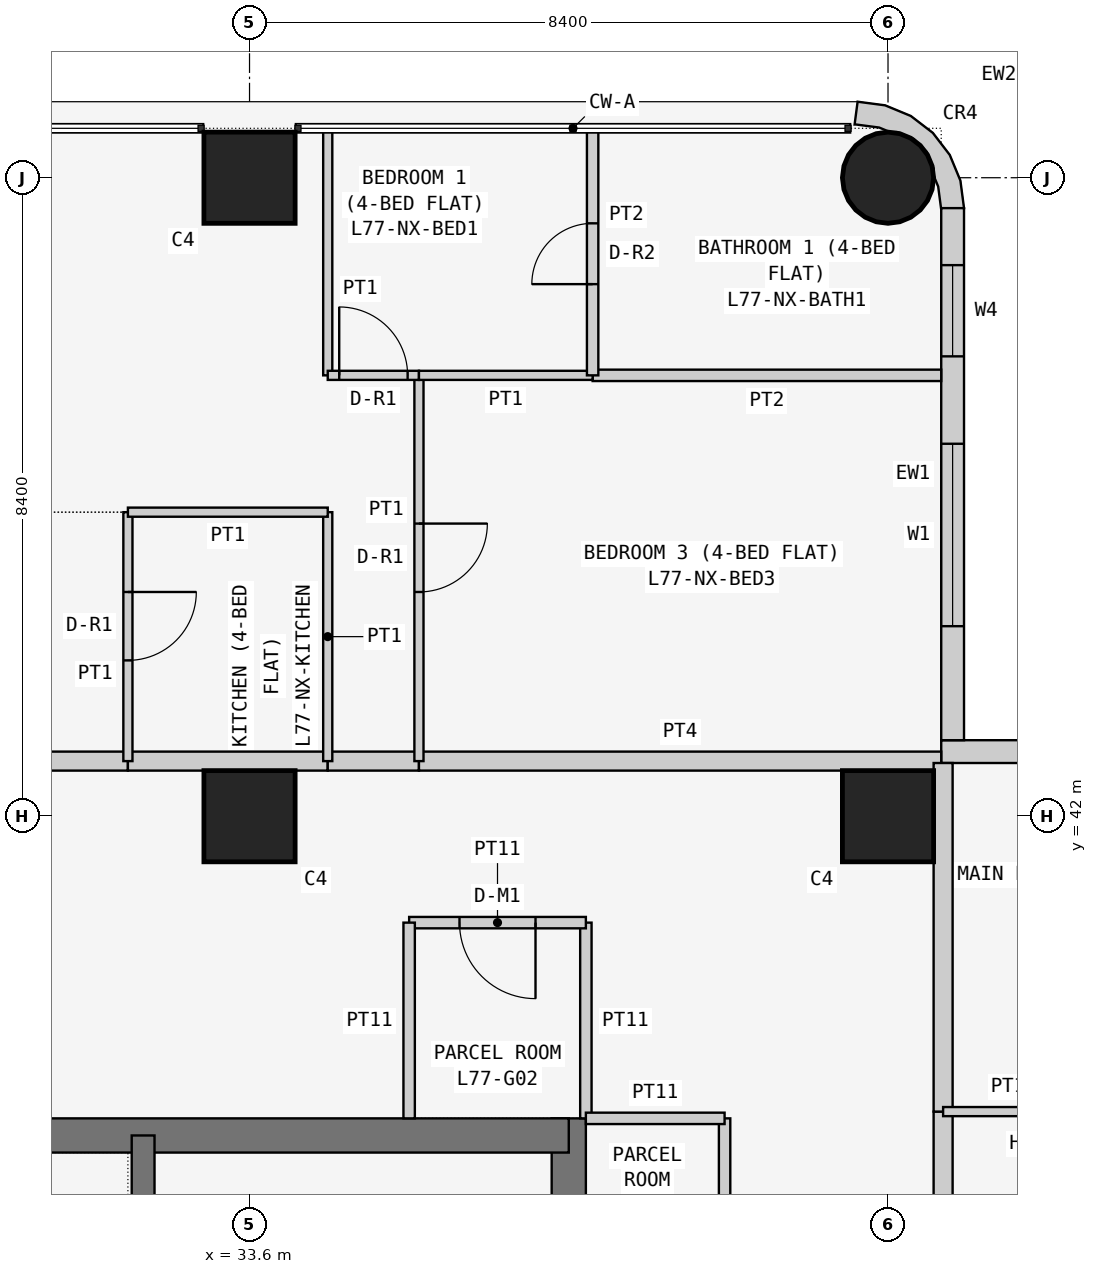
"""IFC4 building model, lengths in metres.
Left out: names, types, materials, properties, quantities, classifications, styles, units other than length and angle.
Written with IfcOpenShell. Run it as: python <this file> out.ifc"""

import sys

from ifc_helpers import new_model, si_unit, direction, frame, frame_2d, origin, origin_2d, place, context, subcontext, project, spatial, polyline, rectangle, circle, outline, extrude, element, fill, save


model = new_model("IFC4")
c1 = context("Model", 3, precision=1e-05, world=origin(), true_north=direction((0.0, 1.0)))
c2 = subcontext(c1, "Body", "Model", "MODEL_VIEW")
j1 = project(units=[si_unit("LENGTHUNIT", "METRE"), si_unit("PLANEANGLEUNIT", "RADIAN")], contexts=[c1])
p1 = place(None, origin())
s1 = spatial("IfcSite", under=j1, at=p1, CompositionType="ELEMENT")
p2 = place(p1, origin())
s2 = spatial("IfcBuilding", under=s1, at=p2, CompositionType="ELEMENT")
p3 = place(p2, frame((0.0, 0.0, 293.7)))
s3 = spatial("IfcBuildingStorey", under=s2, at=p3, CompositionType="ELEMENT", Elevation=293.7)
for number, where, z_axis, x_axis in (
    (1, (33.6, 42.0, 0.0), (0.0, 0.0, 1.0), (1.0, 0.0, 0.0)),
    (2, (33.6, 50.4, 0.0), (0.0, 0.0, 1.0), (1.0, 0.0, 0.0)),
    (3, (42.0, 42.0, 0.0), (0.0, 0.0, 1.0), (1.0, 0.0, 0.0)),
):
    element("IfcColumn", number, at=place(p3, frame(where, z_axis=z_axis, x_axis=x_axis)), inside=s3, PredefinedType="COLUMN", context=c2, shape_type="SweptSolid", body=[
        extrude(rectangle(XDim=1.2, YDim=1.2, at=origin_2d()), origin(), (0.0, 0.0, 1.0), 3.6),
    ])
p4 = place(p3, frame((42.0, 50.4, 0.0), z_axis=(0.0, 0.0, 1.0), x_axis=(1.0, 0.0, 0.0)))
e4 = element("IfcColumn", 4, at=p4, inside=s3, PredefinedType="COLUMN", context=c2, shape_type="SweptSolid", body=[
    extrude(circle(Radius=0.6, at=origin_2d()), origin(), (0.0, 0.0, 1.0), 3.6),
])
p5 = place(p3, frame((37.8, 21.0, 0.0), z_axis=(0.0, 0.0, 1.0), x_axis=(0.0, 1.0, 0.0)))
e5 = element("IfcWall", 5, at=p5, inside=s3, PredefinedType="SHEAR", context=c2, shape_type="SweptSolid", body=[
    extrude(rectangle(XDim=17.025, YDim=0.45, at=frame_2d((8.512, 0.0))), origin(), (0.0, 0.0, 1.0), 3.6),
])
p6 = place(p5, frame((5.2, 0.0, 0.0)))
e6 = element("IfcOpeningElement", 6, at=p6, cuts=e5, PredefinedType="OPENING", context=c2, shape_type="SweptSolid", body=[
    extrude(rectangle(XDim=1.2, YDim=2.1, at=frame_2d((0.6, 1.05))), frame((0.0, 0.235, 0.0), z_axis=(0.0, -1.0, 0.0), x_axis=(1.0, 0.0, 0.0)), (0.0, 0.0, 1.0), 0.47),
])
p7 = place(p3, frame((37.8, 37.8, 0.0), z_axis=(0.0, 0.0, 1.0), x_axis=(-1.0, 0.0, 0.0)))
e7 = element("IfcWall", 7, at=p7, inside=s3, PredefinedType="SHEAR", context=c2, shape_type="SweptSolid", body=[
    extrude(rectangle(XDim=17.025, YDim=0.45, at=frame_2d((8.513, 0.0))), origin(), (0.0, 0.0, 1.0), 3.6),
])
p8 = place(p3, frame((32.2, 29.25, 0.0), z_axis=(0.0, 0.0, 1.0), x_axis=(0.0, 1.0, 0.0)))
e8 = element("IfcWall", 8, at=p8, inside=s3, PredefinedType="SHEAR", context=c2, shape_type="SweptSolid", body=[
    extrude(rectangle(XDim=8.55, YDim=0.3, at=frame_2d((4.275, 0.0))), origin(), (0.0, 0.0, 1.0), 3.6),
])
p9 = place(p3, frame((50.0, 42.85, 0.0), z_axis=(0.0, 0.0, 1.0), x_axis=(-1.0, 0.0, 0.0)))
e9 = element("IfcWall", 9, at=p9, inside=s3, PredefinedType="SOLIDWALL", context=c2, shape_type="SweptSolid", body=[
    extrude(rectangle(XDim=7.3, YDim=0.3, at=frame_2d((3.65, 0.0))), origin(), (0.0, 0.0, 1.0), 3.45),
])
p10 = place(p9, frame((3.1, 0.0, 0.9)))
e10 = element("IfcOpeningElement", 10, at=p10, cuts=e9, PredefinedType="OPENING", context=c2, shape_type="SweptSolid", body=[
    extrude(rectangle(XDim=2.4, YDim=1.5, at=frame_2d((1.2, 0.75))), frame((0.0, 0.16, 0.0), z_axis=(0.0, -1.0, 0.0), x_axis=(1.0, 0.0, 0.0)), (0.0, 0.0, 1.0), 0.32),
])
p11 = place(p9, frame((0.75, 0.0, 0.9)))
e11 = element("IfcOpeningElement", 11, at=p11, cuts=e9, PredefinedType="OPENING", context=c2, shape_type="SweptSolid", body=[
    extrude(rectangle(XDim=1.2, YDim=1.5, at=frame_2d((0.6, 0.75))), frame((0.0, 0.16, 0.0), z_axis=(0.0, -1.0, 0.0), x_axis=(1.0, 0.0, 0.0)), (0.0, 0.0, 1.0), 0.32),
])
p12 = place(p3, frame((42.85, 43.0, 0.0), z_axis=(0.0, 0.0, 1.0), x_axis=(0.0, 1.0, 0.0)))
e12 = element("IfcWall", 12, at=p12, inside=s3, PredefinedType="SOLIDWALL", context=c2, shape_type="SweptSolid", body=[
    extrude(rectangle(XDim=7.0, YDim=0.3, at=frame_2d((3.5, 0.0))), origin(), (0.0, 0.0, 1.0), 3.45),
])
p13 = place(p12, frame((1.5, 0.0, 0.9)))
e13 = element("IfcOpeningElement", 13, at=p13, cuts=e12, PredefinedType="OPENING", context=c2, shape_type="SweptSolid", body=[
    extrude(rectangle(XDim=2.4, YDim=1.5, at=frame_2d((1.2, 0.75))), frame((0.0, 0.16, 0.0), z_axis=(0.0, -1.0, 0.0), x_axis=(1.0, 0.0, 0.0)), (0.0, 0.0, 1.0), 0.32),
])
p14 = place(p12, frame((5.05, 0.0, 0.9)))
e14 = element("IfcOpeningElement", 14, at=p14, cuts=e12, PredefinedType="OPENING", context=c2, shape_type="SweptSolid", body=[
    extrude(rectangle(XDim=1.2, YDim=1.5, at=frame_2d((0.6, 0.75))), frame((0.0, 0.16, 0.0), z_axis=(0.0, -1.0, 0.0), x_axis=(1.0, 0.0, 0.0)), (0.0, 0.0, 1.0), 0.32),
])
p15 = place(p3, frame((42.576, 50.038, 0.0), z_axis=(0.0, 0.0, 1.0), x_axis=(0.707106781187, 0.707106781187, 0.0)))
e15 = element("IfcWall", 15, at=p15, inside=s3, PredefinedType="SOLIDWALL", context=c2, shape_type="SweptSolid", body=[
    extrude(outline(polyline([(0.233, 0.114), (0.047, -0.129), (0.033, -0.143), (0.273, -0.327), (0.495, -0.037), (0.635, 0.3), (0.683, 0.663), (0.635, 1.025), (0.495, 1.363), (0.273, 1.653), (0.033, 1.469), (0.047, 1.455), (0.233, 1.212), (0.292, 1.069), (0.358, 1.003), (0.449, 0.782), (0.449, 0.543), (0.358, 0.322), (0.292, 0.257), (0.233, 0.114)])), origin(), (0.0, 0.0, 1.0), 3.45),
])
p16 = place(p3, frame((38.025, 38.025, 0.0), z_axis=(0.0, 0.0, 1.0), x_axis=(0.0, 1.0, 0.0)))
e16 = element("IfcWall", 16, at=p16, inside=s3, PredefinedType="PARTITIONING", context=c2, shape_type="SweptSolid", body=[
    extrude(rectangle(XDim=2.575, YDim=0.15, at=frame_2d((1.288, 0.0))), origin(), (0.0, 0.0, 1.0), 3.45),
])
p17 = place(p3, frame((38.025, 40.6, 0.0), z_axis=(0.0, 0.0, 1.0), x_axis=(-1.0, 0.0, 0.0)))
e17 = element("IfcWall", 17, at=p17, inside=s3, PredefinedType="PARTITIONING", context=c2, shape_type="SweptSolid", body=[
    extrude(rectangle(XDim=2.325, YDim=0.15, at=frame_2d((1.163, 0.0))), origin(), (0.0, 0.0, 1.0), 3.45),
])
p18 = place(p17, frame((0.663, 0.0, 0.0)))
e18 = element("IfcOpeningElement", 18, at=p18, cuts=e17, PredefinedType="OPENING", context=c2, shape_type="SweptSolid", body=[
    extrude(rectangle(XDim=1.0, YDim=2.1, at=frame_2d((0.5, 1.05))), frame((0.0, 0.085, 0.0), z_axis=(0.0, -1.0, 0.0), x_axis=(1.0, 0.0, 0.0)), (0.0, 0.0, 1.0), 0.17),
])
p19 = place(p3, frame((35.7, 40.6, 0.0), z_axis=(0.0, 0.0, 1.0), x_axis=(0.0, -1.0, 0.0)))
e19 = element("IfcWall", 19, at=p19, inside=s3, PredefinedType="PARTITIONING", context=c2, shape_type="SweptSolid", body=[
    extrude(rectangle(XDim=2.575, YDim=0.15, at=frame_2d((1.288, 0.0))), origin(), (0.0, 0.0, 1.0), 3.45),
])
p20 = place(p3, frame((39.85, 34.5, 0.0), z_axis=(0.0, 0.0, 1.0), x_axis=(0.0, 1.0, 0.0)))
e20 = element("IfcWall", 20, at=p20, inside=s3, PredefinedType="PARTITIONING", context=c2, shape_type="SweptSolid", body=[
    extrude(rectangle(XDim=3.525, YDim=0.15, at=frame_2d((1.762, 0.0))), origin(), (0.0, 0.0, 1.0), 3.45),
])
p21 = place(p20, frame((1.262, 0.0, 0.0)))
e21 = element("IfcOpeningElement", 21, at=p21, cuts=e20, PredefinedType="OPENING", context=c2, shape_type="SweptSolid", body=[
    extrude(rectangle(XDim=1.0, YDim=2.1, at=frame_2d((0.5, 1.05))), frame((0.0, 0.085, 0.0), z_axis=(0.0, -1.0, 0.0), x_axis=(1.0, 0.0, 0.0)), (0.0, 0.0, 1.0), 0.17),
])
p22 = place(p3, frame((39.85, 38.025, 0.0), z_axis=(0.0, 0.0, 1.0), x_axis=(-1.0, 0.0, 0.0)))
e22 = element("IfcWall", 22, at=p22, inside=s3, PredefinedType="PARTITIONING", context=c2, shape_type="SweptSolid", body=[
    extrude(rectangle(XDim=1.825, YDim=0.15, at=frame_2d((0.913, 0.0))), origin(), (0.0, 0.0, 1.0), 3.45),
])
p23 = place(p3, frame((26.8, 42.725, 0.0), z_axis=(0.0, 0.0, 1.0), x_axis=(1.0, 0.0, 0.0)))
e23 = element("IfcWall", 23, at=p23, inside=s3, PredefinedType="PARTITIONING", context=c2, shape_type="SweptSolid", body=[
    extrude(rectangle(XDim=5.2, YDim=0.25, at=frame_2d((2.6, 0.0))), origin(), (0.0, 0.0, 1.0), 3.45),
])
p24 = place(p23, frame((2.1, 0.0, 0.0)))
e24 = element("IfcOpeningElement", 24, at=p24, cuts=e23, PredefinedType="OPENING", context=c2, shape_type="SweptSolid", body=[
    extrude(rectangle(XDim=1.0, YDim=2.1, at=frame_2d((0.5, 1.05))), frame((0.0, 0.135, 0.0), z_axis=(0.0, -1.0, 0.0), x_axis=(1.0, 0.0, 0.0)), (0.0, 0.0, 1.0), 0.27),
])
p25 = place(p3, frame((32.0, 42.725, 0.0), z_axis=(0.0, 0.0, 1.0), x_axis=(1.0, 0.0, 0.0)))
e25 = element("IfcWall", 25, at=p25, inside=s3, PredefinedType="PARTITIONING", context=c2, shape_type="SweptSolid", body=[
    extrude(rectangle(XDim=2.629, YDim=0.25, at=frame_2d((1.314, 0.0))), origin(), (0.0, 0.0, 1.0), 3.45),
])
p26 = place(p3, frame((34.629, 42.725, 0.0), z_axis=(0.0, 0.0, 1.0), x_axis=(1.0, 0.0, 0.0)))
e26 = element("IfcWall", 26, at=p26, inside=s3, PredefinedType="PARTITIONING", context=c2, shape_type="SweptSolid", body=[
    extrude(rectangle(XDim=1.2, YDim=0.25, at=frame_2d((0.6, 0.0))), origin(), (0.0, 0.0, 1.0), 3.45),
])
p27 = place(p3, frame((35.829, 42.725, 0.0), z_axis=(0.0, 0.0, 1.0), x_axis=(1.0, 0.0, 0.0)))
e27 = element("IfcWall", 27, at=p27, inside=s3, PredefinedType="PARTITIONING", context=c2, shape_type="SweptSolid", body=[
    extrude(rectangle(XDim=6.871, YDim=0.25, at=frame_2d((3.436, 0.0))), origin(), (0.0, 0.0, 1.0), 3.45),
])
p28 = place(p3, frame((42.725, 38.114, 0.0), z_axis=(0.0, 0.0, 1.0), x_axis=(0.0, -1.0, 0.0)))
e28 = element("IfcWall", 28, at=p28, inside=s3, PredefinedType="PARTITIONING", context=c2, shape_type="SweptSolid", body=[
    extrude(rectangle(XDim=1.214, YDim=0.25, at=frame_2d((0.607, 0.0))), origin(), (0.0, 0.0, 1.0), 3.45),
])
p29 = place(p3, frame((42.725, 42.7, 0.0), z_axis=(0.0, 0.0, 1.0), x_axis=(0.0, -1.0, 0.0)))
e29 = element("IfcWall", 29, at=p29, inside=s3, PredefinedType="PARTITIONING", context=c2, shape_type="SweptSolid", body=[
    extrude(rectangle(XDim=4.586, YDim=0.25, at=frame_2d((2.293, 0.0))), origin(), (0.0, 0.0, 1.0), 3.45),
])
p30 = place(p3, frame((32.0, 42.725, 0.0), z_axis=(0.0, 0.0, 1.0), x_axis=(0.0, 1.0, 0.0)))
e30 = element("IfcWall", 30, at=p30, inside=s3, PredefinedType="PARTITIONING", context=c2, shape_type="SweptSolid", body=[
    extrude(rectangle(XDim=3.275, YDim=0.12, at=frame_2d((1.637, 0.0))), origin(), (0.0, 0.0, 1.0), 3.45),
])
p31 = place(p30, frame((1.325, 0.0, 0.0)))
e31 = element("IfcOpeningElement", 31, at=p31, cuts=e30, PredefinedType="OPENING", context=c2, shape_type="SweptSolid", body=[
    extrude(rectangle(XDim=0.9, YDim=2.1, at=frame_2d((0.45, 1.05))), frame((0.0, 0.07, 0.0), z_axis=(0.0, -1.0, 0.0), x_axis=(1.0, 0.0, 0.0)), (0.0, 0.0, 1.0), 0.14),
])
p32 = place(p3, frame((34.629, 42.725, 0.0), z_axis=(0.0, 0.0, 1.0), x_axis=(0.0, 1.0, 0.0)))
e32 = element("IfcWall", 32, at=p32, inside=s3, PredefinedType="PARTITIONING", context=c2, shape_type="SweptSolid", body=[
    extrude(rectangle(XDim=3.275, YDim=0.12, at=frame_2d((1.637, 0.0))), origin(), (0.0, 0.0, 1.0), 3.45),
])
p33 = place(p3, frame((34.629, 46.0, 0.0), z_axis=(0.0, 0.0, 1.0), x_axis=(-1.0, 0.0, 0.0)))
e33 = element("IfcWall", 33, at=p33, inside=s3, PredefinedType="PARTITIONING", context=c2, shape_type="SweptSolid", body=[
    extrude(rectangle(XDim=2.629, YDim=0.12, at=frame_2d((1.314, 0.0))), origin(), (0.0, 0.0, 1.0), 3.45),
])
p34 = place(p3, frame((35.829, 47.8, 0.0), z_axis=(0.0, 0.0, 1.0), x_axis=(0.0, -1.0, 0.0)))
e34 = element("IfcWall", 34, at=p34, inside=s3, PredefinedType="PARTITIONING", context=c2, shape_type="SweptSolid", body=[
    extrude(rectangle(XDim=5.075, YDim=0.12, at=frame_2d((2.538, 0.0))), origin(), (0.0, 0.0, 1.0), 3.45),
])
p35 = place(p34, frame((1.95, 0.0, 0.0)))
e35 = element("IfcOpeningElement", 35, at=p35, cuts=e34, PredefinedType="OPENING", context=c2, shape_type="SweptSolid", body=[
    extrude(rectangle(XDim=0.9, YDim=2.1, at=frame_2d((0.45, 1.05))), frame((0.0, 0.07, 0.0), z_axis=(0.0, -1.0, 0.0), x_axis=(1.0, 0.0, 0.0)), (0.0, 0.0, 1.0), 0.14),
])
p36 = place(p3, frame((34.629, 51.05, 0.0), z_axis=(0.0, 0.0, 1.0), x_axis=(0.0, -1.0, 0.0)))
e36 = element("IfcWall", 36, at=p36, inside=s3, PredefinedType="PARTITIONING", context=c2, shape_type="SweptSolid", body=[
    extrude(rectangle(XDim=3.25, YDim=0.12, at=frame_2d((1.625, 0.0))), origin(), (0.0, 0.0, 1.0), 3.45),
])
p37 = place(p3, frame((34.629, 47.8, 0.0), z_axis=(0.0, 0.0, 1.0), x_axis=(1.0, 0.0, 0.0)))
e37 = element("IfcWall", 37, at=p37, inside=s3, PredefinedType="PARTITIONING", context=c2, shape_type="SweptSolid", body=[
    extrude(rectangle(XDim=1.2, YDim=0.12, at=frame_2d((0.6, 0.0))), origin(), (0.0, 0.0, 1.0), 3.45),
])
p38 = place(p37, frame((0.151, 0.0, 0.0)))
e38 = element("IfcOpeningElement", 38, at=p38, cuts=e37, PredefinedType="OPENING", context=c2, shape_type="SweptSolid", body=[
    extrude(rectangle(XDim=0.9, YDim=2.1, at=frame_2d((0.45, 1.05))), frame((0.0, 0.07, 0.0), z_axis=(0.0, -1.0, 0.0), x_axis=(1.0, 0.0, 0.0)), (0.0, 0.0, 1.0), 0.14),
])
p39 = place(p3, frame((42.7, 47.8, 0.0), z_axis=(0.0, 0.0, 1.0), x_axis=(-1.0, 0.0, 0.0)))
e39 = element("IfcWall", 39, at=p39, inside=s3, PredefinedType="PARTITIONING", context=c2, shape_type="SweptSolid", body=[
    extrude(rectangle(XDim=4.586, YDim=0.15, at=frame_2d((2.293, 0.0))), origin(), (0.0, 0.0, 1.0), 3.45),
])
p40 = place(p3, frame((38.114, 47.8, 0.0), z_axis=(0.0, 0.0, 1.0), x_axis=(-1.0, 0.0, 0.0)))
e40 = element("IfcWall", 40, at=p40, inside=s3, PredefinedType="PARTITIONING", context=c2, shape_type="SweptSolid", body=[
    extrude(rectangle(XDim=2.285, YDim=0.12, at=frame_2d((1.143, 0.0))), origin(), (0.0, 0.0, 1.0), 3.45),
])
p41 = place(p3, frame((38.114, 51.05, 0.0), z_axis=(0.0, 0.0, 1.0), x_axis=(0.0, -1.0, 0.0)))
e41 = element("IfcWall", 41, at=p41, inside=s3, PredefinedType="PARTITIONING", context=c2, shape_type="SweptSolid", body=[
    extrude(rectangle(XDim=3.25, YDim=0.15, at=frame_2d((1.625, 0.0))), origin(), (0.0, 0.0, 1.0), 3.45),
])
p42 = place(p41, frame((1.25, 0.0, 0.0)))
e42 = element("IfcOpeningElement", 42, at=p42, cuts=e41, PredefinedType="OPENING", context=c2, shape_type="SweptSolid", body=[
    extrude(rectangle(XDim=0.8, YDim=2.1, at=frame_2d((0.4, 1.05))), frame((0.0, 0.085, 0.0), z_axis=(0.0, -1.0, 0.0), x_axis=(1.0, 0.0, 0.0)), (0.0, 0.0, 1.0), 0.17),
])
p43 = place(p3, frame((47.0, 38.114, 0.0), z_axis=(0.0, 0.0, 1.0), x_axis=(-1.0, 0.0, 0.0)))
e43 = element("IfcWall", 43, at=p43, inside=s3, PredefinedType="PARTITIONING", context=c2, shape_type="SweptSolid", body=[
    extrude(rectangle(XDim=4.275, YDim=0.12, at=frame_2d((2.137, 0.0))), origin(), (0.0, 0.0, 1.0), 3.45),
])
p44 = place(p43, frame((1.05, 0.0, 0.0)))
e44 = element("IfcOpeningElement", 44, at=p44, cuts=e43, PredefinedType="OPENING", context=c2, shape_type="SweptSolid", body=[
    extrude(rectangle(XDim=0.9, YDim=2.1, at=frame_2d((0.45, 1.05))), frame((0.0, 0.07, 0.0), z_axis=(0.0, -1.0, 0.0), x_axis=(1.0, 0.0, 0.0)), (0.0, 0.0, 1.0), 0.14),
])
p45 = place(p13, origin())
e45 = element("IfcWindow", 45, at=p45, inside=s3, PartitioningType="SINGLE_PANEL", PredefinedType="WINDOW", context=c2, shape_type="SweptSolid", body=[
    extrude(rectangle(XDim=2.4, YDim=1.5, at=frame_2d((1.2, 0.75))), frame((0.0, 0.03, 0.0), z_axis=(0.0, -1.0, 0.0), x_axis=(1.0, 0.0, 0.0)), (0.0, 0.0, 1.0), 0.06),
])
fill(e13, e45)
p46 = place(p14, origin())
e46 = element("IfcWindow", 46, at=p46, inside=s3, PartitioningType="SINGLE_PANEL", PredefinedType="WINDOW", context=c2, shape_type="SweptSolid", body=[
    extrude(rectangle(XDim=1.2, YDim=1.5, at=frame_2d((0.6, 0.75))), frame((0.0, 0.03, 0.0), z_axis=(0.0, -1.0, 0.0), x_axis=(1.0, 0.0, 0.0)), (0.0, 0.0, 1.0), 0.06),
])
fill(e14, e46)
p47 = place(p18, origin())
e47 = element("IfcDoor", 47, at=p47, inside=s3, OperationType="SINGLE_SWING_LEFT", PredefinedType="DOOR", context=c2, shape_type="SweptSolid", body=[
    extrude(rectangle(XDim=1.0, YDim=2.1, at=frame_2d((0.5, 1.05))), frame((0.0, 0.025, 0.0), z_axis=(0.0, -1.0, 0.0), x_axis=(1.0, 0.0, 0.0)), (0.0, 0.0, 1.0), 0.05),
])
fill(e18, e47)
p48 = place(p31, frame((0.9, 0.0, 0.0), z_axis=(0.0, 0.0, 1.0), x_axis=(-1.0, 0.0, 0.0)))
e48 = element("IfcDoor", 48, at=p48, inside=s3, OperationType="SINGLE_SWING_LEFT", PredefinedType="DOOR", context=c2, shape_type="SweptSolid", body=[
    extrude(rectangle(XDim=0.9, YDim=2.1, at=frame_2d((0.45, 1.05))), frame((0.0, 0.025, 0.0), z_axis=(0.0, -1.0, 0.0), x_axis=(1.0, 0.0, 0.0)), (0.0, 0.0, 1.0), 0.05),
])
fill(e31, e48)
p49 = place(p35, origin())
e49 = element("IfcDoor", 49, at=p49, inside=s3, OperationType="SINGLE_SWING_LEFT", PredefinedType="DOOR", context=c2, shape_type="SweptSolid", body=[
    extrude(rectangle(XDim=0.9, YDim=2.1, at=frame_2d((0.45, 1.05))), frame((0.0, 0.025, 0.0), z_axis=(0.0, -1.0, 0.0), x_axis=(1.0, 0.0, 0.0)), (0.0, 0.0, 1.0), 0.05),
])
fill(e35, e49)
p50 = place(p38, origin())
e50 = element("IfcDoor", 50, at=p50, inside=s3, OperationType="SINGLE_SWING_LEFT", PredefinedType="DOOR", context=c2, shape_type="SweptSolid", body=[
    extrude(rectangle(XDim=0.9, YDim=2.1, at=frame_2d((0.45, 1.05))), frame((0.0, 0.025, 0.0), z_axis=(0.0, -1.0, 0.0), x_axis=(1.0, 0.0, 0.0)), (0.0, 0.0, 1.0), 0.05),
])
fill(e38, e50)
p51 = place(p42, frame((0.8, 0.0, 0.0), z_axis=(0.0, 0.0, 1.0), x_axis=(-1.0, 0.0, 0.0)))
e51 = element("IfcDoor", 51, at=p51, inside=s3, OperationType="SINGLE_SWING_LEFT", PredefinedType="DOOR", context=c2, shape_type="SweptSolid", body=[
    extrude(rectangle(XDim=0.8, YDim=2.1, at=frame_2d((0.4, 1.05))), frame((0.0, 0.025, 0.0), z_axis=(0.0, -1.0, 0.0), x_axis=(1.0, 0.0, 0.0)), (0.0, 0.0, 1.0), 0.05),
])
fill(e42, e51)
save(model, sys.argv[1])
